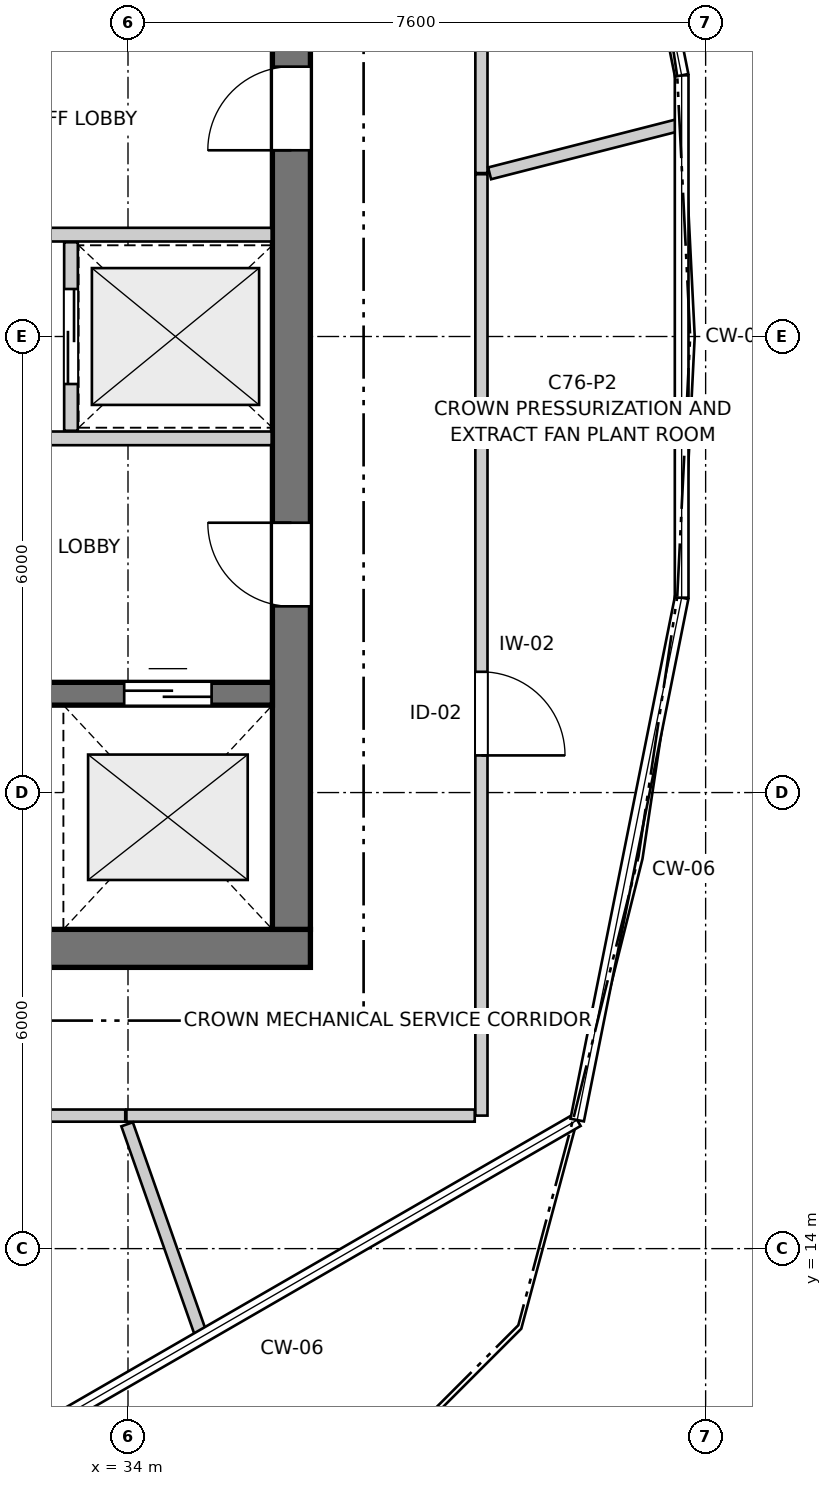
"""IFC4 building model, lengths in metres.
Left out: names, types, materials, properties, quantities, classifications, styles, units other than length and angle.
Written with IfcOpenShell. Run it as: python <this file> out.ifc"""

import sys

from ifc_helpers import new_model, si_unit, direction, frame, frame_2d, origin, place, context, subcontext, project, spatial, rectangle, extrude, source, transform, mapped, element, fill, save


model = new_model("IFC4")
c1 = context("Model", 3, precision=1e-05, world=origin(), true_north=direction((0.0, 1.0)))
c2 = subcontext(c1, "Body", "Model", "MODEL_VIEW")
j1 = project(units=[si_unit("LENGTHUNIT", "METRE"), si_unit("PLANEANGLEUNIT", "RADIAN")], contexts=[c1])
p1 = place(None, origin())
s1 = spatial("IfcSite", under=j1, at=p1, CompositionType="ELEMENT")
p2 = place(p1, origin())
s2 = spatial("IfcBuilding", under=s1, at=p2, CompositionType="ELEMENT")
p3 = place(p2, frame((0.0, 0.0, 253.2)))
s3 = spatial("IfcBuildingStorey", under=s2, at=p3, CompositionType="ELEMENT", Elevation=253.2)
p4 = place(p3, frame((24.3, 17.95, 0.0), z_axis=(0.0, 0.0, 1.0), x_axis=(1.0, 0.0, 0.0)))
e1 = element("IfcWall", 1, at=p4, inside=s3, PredefinedType="SHEAR", context=c2, shape_type="SweptSolid", body=[
    extrude(rectangle(XDim=12.1, YDim=0.5, at=frame_2d((6.05, 0.0))), origin(), (0.0, 0.0, 1.0), 4.05),
])
p5 = place(p3, frame((36.15, 18.2, 0.0), z_axis=(0.0, 0.0, 1.0), x_axis=(0.0, 1.0, 0.0)))
e2 = element("IfcWall", 2, at=p5, inside=s3, PredefinedType="SHEAR", context=c2, shape_type="SweptSolid", body=[
    extrude(rectangle(XDim=15.6, YDim=0.5, at=frame_2d((7.8, 0.0))), origin(), (0.0, 0.0, 1.0), 4.05),
])
p6 = place(p5, frame((4.25, 0.0, 0.0)))
e3 = element("IfcOpeningElement", 3, at=p6, cuts=e2, PredefinedType="OPENING", context=c2, shape_type="SweptSolid", body=[
    extrude(rectangle(XDim=1.1, YDim=2.15, at=frame_2d((0.55, 1.075))), frame((0.0, 0.26, 0.0), z_axis=(0.0, -1.0, 0.0), x_axis=(1.0, 0.0, 0.0)), (0.0, 0.0, 1.0), 0.52),
])
p7 = place(p5, frame((10.25, 0.0, 0.0)))
e4 = element("IfcOpeningElement", 4, at=p7, cuts=e2, PredefinedType="OPENING", context=c2, shape_type="SweptSolid", body=[
    extrude(rectangle(XDim=1.1, YDim=2.15, at=frame_2d((0.55, 1.075))), frame((0.0, 0.26, 0.0), z_axis=(0.0, -1.0, 0.0), x_axis=(1.0, 0.0, 0.0)), (0.0, 0.0, 1.0), 0.52),
])
p8 = place(p3, frame((24.8, 21.3, 0.0), z_axis=(0.0, 0.0, 1.0), x_axis=(1.0, 0.0, 0.0)))
e5 = element("IfcWall", 5, at=p8, inside=s3, PredefinedType="SHEAR", context=c2, shape_type="SweptSolid", body=[
    extrude(rectangle(XDim=11.1, YDim=0.3, at=frame_2d((5.55, 0.0))), origin(), (0.0, 0.0, 1.0), 4.05),
])
p9 = place(p8, frame((6.22, 0.0, 0.0)))
e6 = element("IfcOpeningElement", 6, at=p9, cuts=e5, PredefinedType="OPENING", context=c2, shape_type="SweptSolid", body=[
    extrude(rectangle(XDim=0.98, YDim=2.15, at=frame_2d((0.49, 1.075))), frame((0.0, 0.16, 0.0), z_axis=(0.0, -1.0, 0.0), x_axis=(1.0, 0.0, 0.0)), (0.0, 0.0, 1.0), 0.32),
])
p10 = place(p8, frame((9.15, 0.0, 0.0)))
e7 = element("IfcOpeningElement", 7, at=p10, cuts=e5, PredefinedType="OPENING", context=c2, shape_type="SweptSolid", body=[
    extrude(rectangle(XDim=1.15, YDim=2.15, at=frame_2d((0.575, 1.075))), frame((0.0, 0.16, 0.0), z_axis=(0.0, -1.0, 0.0), x_axis=(1.0, 0.0, 0.0)), (0.0, 0.0, 1.0), 0.32),
])
p11 = place(p3, frame((30.67, 24.66, 0.0), z_axis=(0.0, 0.0, 1.0), x_axis=(1.0, 0.0, 0.0)))
e8 = element("IfcWall", 8, at=p11, inside=s3, PredefinedType="PARTITIONING", context=c2, shape_type="SweptSolid", body=[
    extrude(rectangle(XDim=5.22, YDim=0.18, at=frame_2d((2.61, 0.0))), origin(), (0.0, 0.0, 1.0), 4.05),
])
p12 = place(p11, frame((0.68, 0.0, 0.0)))
e9 = element("IfcOpeningElement", 9, at=p12, cuts=e8, PredefinedType="OPENING", context=c2, shape_type="SweptSolid", body=[
    extrude(rectangle(XDim=0.98, YDim=2.15, at=frame_2d((0.49, 1.075))), frame((0.0, 0.1, 0.0), z_axis=(0.0, -1.0, 0.0), x_axis=(1.0, 0.0, 0.0)), (0.0, 0.0, 1.0), 0.2),
])
p13 = place(p3, frame((30.67, 27.34, 0.0), z_axis=(0.0, 0.0, 1.0), x_axis=(1.0, 0.0, 0.0)))
e10 = element("IfcWall", 10, at=p13, inside=s3, PredefinedType="PARTITIONING", context=c2, shape_type="SweptSolid", body=[
    extrude(rectangle(XDim=5.22, YDim=0.18, at=frame_2d((2.61, 0.0))), origin(), (0.0, 0.0, 1.0), 4.05),
])
p14 = place(p13, frame((0.68, 0.0, 0.0)))
e11 = element("IfcOpeningElement", 11, at=p14, cuts=e10, PredefinedType="OPENING", context=c2, shape_type="SweptSolid", body=[
    extrude(rectangle(XDim=0.98, YDim=2.15, at=frame_2d((0.49, 1.075))), frame((0.0, 0.1, 0.0), z_axis=(0.0, -1.0, 0.0), x_axis=(1.0, 0.0, 0.0)), (0.0, 0.0, 1.0), 0.2),
])
p15 = place(p3, frame((33.25, 24.76, 0.0), z_axis=(0.0, 0.0, 1.0), x_axis=(0.0, 1.0, 0.0)))
e12 = element("IfcWall", 12, at=p15, inside=s3, PredefinedType="PARTITIONING", context=c2, shape_type="SweptSolid", body=[
    extrude(rectangle(XDim=2.48, YDim=0.18, at=frame_2d((1.24, 0.0))), origin(), (0.0, 0.0, 1.0), 4.05),
])
p16 = place(p15, frame((0.615, 0.0, 0.0)))
e13 = element("IfcOpeningElement", 13, at=p16, cuts=e12, PredefinedType="OPENING", context=c2, shape_type="SweptSolid", body=[
    extrude(rectangle(XDim=1.25, YDim=2.15, at=frame_2d((0.625, 1.075))), frame((0.0, 0.1, 0.0), z_axis=(0.0, -1.0, 0.0), x_axis=(1.0, 0.0, 0.0)), (0.0, 0.0, 1.0), 0.2),
])
p17 = place(p3, frame((38.65, 28.135, 0.0), z_axis=(0.0, 0.0, 1.0), x_axis=(0.0, -1.0, 0.0)))
e14 = element("IfcWall", 14, at=p17, inside=s3, PredefinedType="PARTITIONING", context=c2, shape_type="SweptSolid", body=[
    extrude(rectangle(XDim=12.385, YDim=0.16, at=frame_2d((6.192, 0.0))), origin(), (0.0, 0.0, 1.0), 4.05),
])
p18 = place(p17, frame((6.546, 0.0, 0.0)))
e15 = element("IfcOpeningElement", 15, at=p18, cuts=e14, PredefinedType="OPENING", context=c2, shape_type="SweptSolid", body=[
    extrude(rectangle(XDim=1.1, YDim=2.15, at=frame_2d((0.55, 1.075))), frame((0.0, 0.09, 0.0), z_axis=(0.0, -1.0, 0.0), x_axis=(1.0, 0.0, 0.0)), (0.0, 0.0, 1.0), 0.18),
])
p19 = place(p3, frame((28.5, 15.75, 0.0), z_axis=(0.0, 0.0, 1.0), x_axis=(1.0, 0.0, 0.0)))
e16 = element("IfcWall", 16, at=p19, inside=s3, PredefinedType="PARTITIONING", context=c2, shape_type="SweptSolid", body=[
    extrude(rectangle(XDim=5.464, YDim=0.16, at=frame_2d((2.732, 0.0))), origin(), (0.0, 0.0, 1.0), 4.05),
])
p20 = place(p19, frame((2.174, 0.0, 0.0)))
e17 = element("IfcOpeningElement", 17, at=p20, cuts=e16, PredefinedType="OPENING", context=c2, shape_type="SweptSolid", body=[
    extrude(rectangle(XDim=1.1, YDim=2.15, at=frame_2d((0.55, 1.075))), frame((0.0, 0.09, 0.0), z_axis=(0.0, -1.0, 0.0), x_axis=(1.0, 0.0, 0.0)), (0.0, 0.0, 1.0), 0.18),
])
p21 = place(p3, frame((38.65, 28.15, 0.0), z_axis=(0.0, 0.0, 1.0), x_axis=(0.0, 1.0, 0.0)))
e18 = element("IfcWall", 18, at=p21, inside=s3, PredefinedType="PARTITIONING", context=c2, shape_type="SweptSolid", body=[
    extrude(rectangle(XDim=8.012, YDim=0.16, at=frame_2d((4.006, 0.0))), origin(), (0.0, 0.0, 1.0), 4.05),
])
p22 = place(p3, frame((33.979, 15.75, 0.0), z_axis=(0.0, 0.0, 1.0), x_axis=(1.0, 0.0, 0.0)))
e19 = element("IfcWall", 19, at=p22, inside=s3, PredefinedType="PARTITIONING", context=c2, shape_type="SweptSolid", body=[
    extrude(rectangle(XDim=4.583, YDim=0.16, at=frame_2d((2.292, 0.0))), origin(), (0.0, 0.0, 1.0), 4.05),
])
p23 = place(p3, frame((33.988, 15.636, 0.0), z_axis=(0.0, 0.0, 1.0), x_axis=(0.331475994505, -0.943463653283, 0.0)))
e20 = element("IfcWall", 20, at=p23, inside=s3, PredefinedType="PARTITIONING", context=c2, shape_type="SweptSolid", body=[
    extrude(rectangle(XDim=2.937, YDim=0.16, at=frame_2d((1.468, 0.0))), origin(), (0.0, 0.0, 1.0), 4.05),
])
p24 = place(p3, frame((38.758, 28.146, 0.0), z_axis=(0.0, 0.0, 1.0), x_axis=(0.968866064002, 0.247585439849, 0.0)))
e21 = element("IfcWall", 21, at=p24, inside=s3, PredefinedType="PARTITIONING", context=c2, shape_type="SweptSolid", body=[
    extrude(rectangle(XDim=2.581, YDim=0.16, at=frame_2d((1.29, 0.0))), origin(), (0.0, 0.0, 1.0), 4.05),
])
m1 = source(origin(), c2, "Body", "SweptSolid", [
    extrude(rectangle(XDim=1.15, YDim=2.15, at=frame_2d((0.575, 1.075))), frame((0.0, 0.025, 0.0), z_axis=(0.0, -1.0, 0.0), x_axis=(1.0, 0.0, 0.0)), (0.0, 0.0, 1.0), 0.05),
])
p25 = place(p10, origin())
e22 = element("IfcDoor", 22, at=p25, inside=s3, OperationType="DOUBLE_DOOR_SLIDING", PredefinedType="DOOR", context=c2, shape_type="MappedRepresentation", body=[
    mapped(m1, transform((0.0, 0.0, 0.0), x_axis=(1.0, 0.0, 0.0), y_axis=(0.0, 1.0, 0.0), z_axis=(0.0, 0.0, 1.0), scale=1.0)),
])
fill(e7, e22)
m2 = source(origin(), c2, "Body", "SweptSolid", [
    extrude(rectangle(XDim=1.1, YDim=2.15, at=frame_2d((0.55, 1.075))), frame((0.0, 0.025, 0.0), z_axis=(0.0, -1.0, 0.0), x_axis=(1.0, 0.0, 0.0)), (0.0, 0.0, 1.0), 0.05),
])
p26 = place(p6, origin())
e23 = element("IfcDoor", 23, at=p26, inside=s3, OperationType="SINGLE_SWING_RIGHT", PredefinedType="DOOR", context=c2, shape_type="MappedRepresentation", body=[
    mapped(m2, transform((0.0, 0.0, 0.0), x_axis=(1.0, 0.0, 0.0), y_axis=(0.0, 1.0, 0.0), z_axis=(0.0, 0.0, 1.0), scale=1.0)),
])
fill(e3, e23)
p27 = place(p7, origin())
e24 = element("IfcDoor", 24, at=p27, inside=s3, OperationType="SINGLE_SWING_LEFT", PredefinedType="DOOR", context=c2, shape_type="MappedRepresentation", body=[
    mapped(m2, transform((0.0, 0.0, 0.0), x_axis=(1.0, 0.0, 0.0), y_axis=(0.0, 1.0, 0.0), z_axis=(0.0, 0.0, 1.0), scale=1.0)),
])
fill(e4, e24)
m3 = source(origin(), c2, "Body", "SweptSolid", [
    extrude(rectangle(XDim=1.25, YDim=2.15, at=frame_2d((0.625, 1.075))), frame((0.0, 0.025, 0.0), z_axis=(0.0, -1.0, 0.0), x_axis=(1.0, 0.0, 0.0)), (0.0, 0.0, 1.0), 0.05),
])
p28 = place(p16, origin())
e25 = element("IfcDoor", 25, at=p28, inside=s3, OperationType="DOUBLE_DOOR_SLIDING", PredefinedType="DOOR", context=c2, shape_type="MappedRepresentation", body=[
    mapped(m3, transform((0.0, 0.0, 0.0), x_axis=(1.0, 0.0, 0.0), y_axis=(0.0, 1.0, 0.0), z_axis=(0.0, 0.0, 1.0), scale=1.0)),
])
fill(e13, e25)
p29 = place(p18, origin())
e26 = element("IfcDoor", 26, at=p29, inside=s3, OperationType="SINGLE_SWING_RIGHT", PredefinedType="DOOR", context=c2, shape_type="MappedRepresentation", body=[
    mapped(m2, transform((0.0, 0.0, 0.0), x_axis=(1.0, 0.0, 0.0), y_axis=(0.0, 1.0, 0.0), z_axis=(0.0, 0.0, 1.0), scale=1.0)),
])
fill(e15, e26)
save(model, sys.argv[1])
